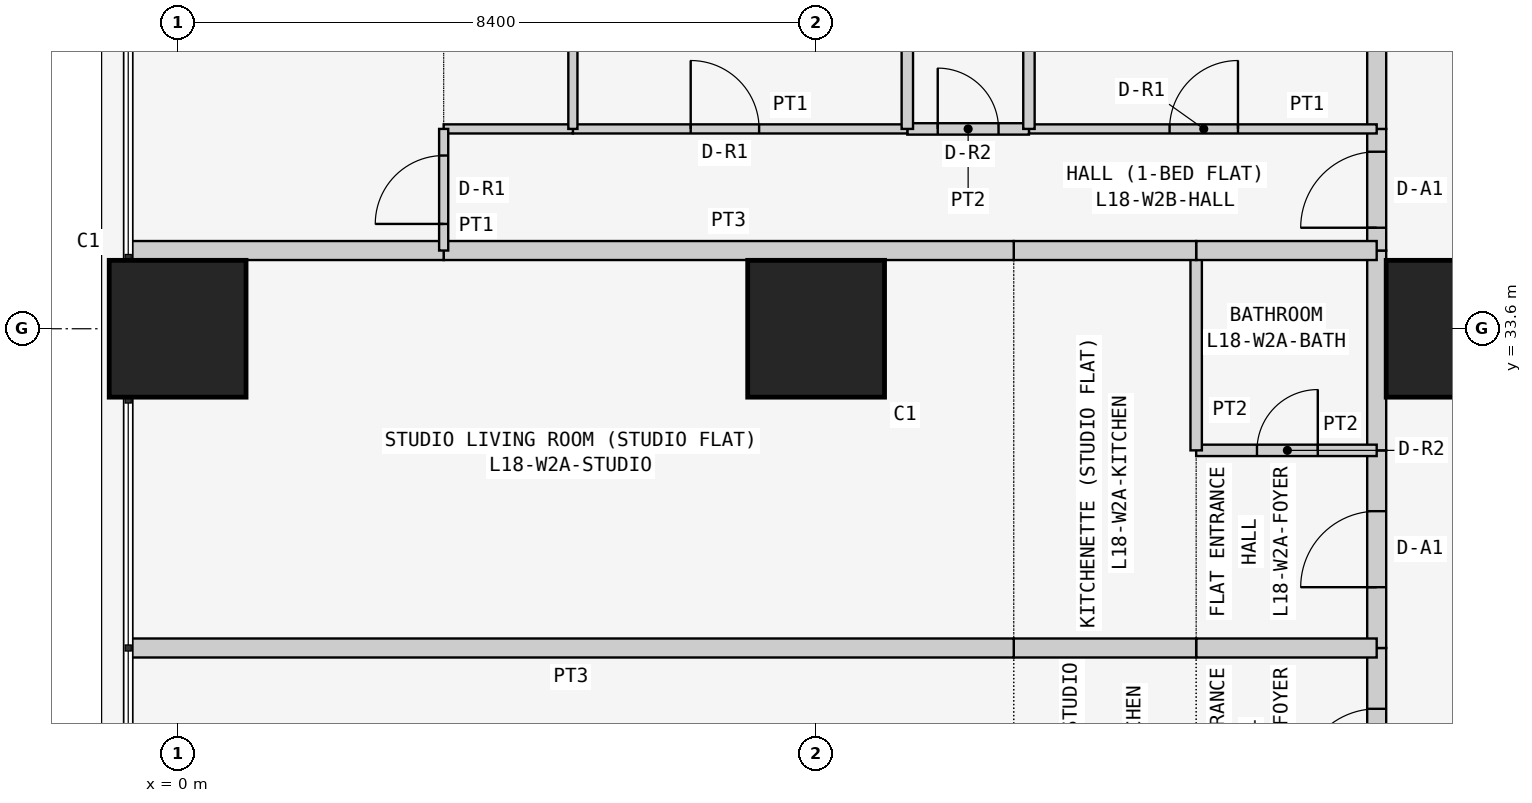
"""IFC4 building model, lengths in metres.
Left out: names, types, materials, properties, quantities, classifications, styles, units other than length and angle.
Written with IfcOpenShell. Run it as: python <this file> out.ifc"""

import sys

from ifc_helpers import new_model, si_unit, direction, frame, frame_2d, origin, origin_2d, place, context, subcontext, project, spatial, rectangle, extrude, element, fill, save


model = new_model("IFC4")
c1 = context("Model", 3, precision=1e-05, world=origin(), true_north=direction((0.0, 1.0)))
c2 = subcontext(c1, "Body", "Model", "MODEL_VIEW")
j1 = project(units=[si_unit("LENGTHUNIT", "METRE"), si_unit("PLANEANGLEUNIT", "RADIAN")], contexts=[c1])
p1 = place(None, origin())
s1 = spatial("IfcSite", under=j1, at=p1, CompositionType="ELEMENT")
p2 = place(p1, origin())
s2 = spatial("IfcBuilding", under=s1, at=p2, CompositionType="ELEMENT")
p3 = place(p2, frame((0.0, 0.0, 74.1)))
s3 = spatial("IfcBuildingStorey", under=s2, at=p3, CompositionType="ELEMENT", Elevation=74.1)
for number, where, z_axis, x_axis in (
    (1, (0.0, 33.6, 0.0), (0.0, 0.0, 1.0), (1.0, 0.0, 0.0)),
    (2, (8.4, 33.6, 0.0), (0.0, 0.0, 1.0), (1.0, 0.0, 0.0)),
    (3, (16.8, 33.6, 0.0), (0.0, 0.0, 1.0), (1.0, 0.0, 0.0)),
):
    element("IfcColumn", number, at=place(p3, frame(where, z_axis=z_axis, x_axis=x_axis)), inside=s3, PredefinedType="COLUMN", context=c2, shape_type="SweptSolid", body=[
        extrude(rectangle(XDim=1.8, YDim=1.8, at=origin_2d()), origin(), (0.0, 0.0, 1.0), 3.6),
    ])
p4 = place(p3, frame((15.775, 26.8, 0.0), z_axis=(0.0, 0.0, 1.0), x_axis=(0.0, 1.0, 0.0)))
e4 = element("IfcWall", 4, at=p4, inside=s3, PredefinedType="PARTITIONING", context=c2, shape_type="SweptSolid", body=[
    extrude(rectangle(XDim=2.6, YDim=0.25, at=frame_2d((1.3, 0.0))), origin(), (0.0, 0.0, 1.0), 3.45),
])
p5 = place(p4, frame((0.8, 0.0, 0.0)))
e5 = element("IfcOpeningElement", 5, at=p5, cuts=e4, PredefinedType="OPENING", context=c2, shape_type="SweptSolid", body=[
    extrude(rectangle(XDim=1.0, YDim=2.1, at=frame_2d((0.5, 1.05))), frame((0.0, 0.135, 0.0), z_axis=(0.0, -1.0, 0.0), x_axis=(1.0, 0.0, 0.0)), (0.0, 0.0, 1.0), 0.27),
])
p6 = place(p3, frame((15.775, 29.4, 0.0), z_axis=(0.0, 0.0, 1.0), x_axis=(0.0, 1.0, 0.0)))
e6 = element("IfcWall", 6, at=p6, inside=s3, PredefinedType="PARTITIONING", context=c2, shape_type="SweptSolid", body=[
    extrude(rectangle(XDim=2.6, YDim=0.25, at=frame_2d((1.3, 0.0))), origin(), (0.0, 0.0, 1.0), 3.45),
])
p7 = place(p6, frame((0.8, 0.0, 0.0)))
e7 = element("IfcOpeningElement", 7, at=p7, cuts=e6, PredefinedType="OPENING", context=c2, shape_type="SweptSolid", body=[
    extrude(rectangle(XDim=1.0, YDim=2.1, at=frame_2d((0.5, 1.05))), frame((0.0, 0.135, 0.0), z_axis=(0.0, -1.0, 0.0), x_axis=(1.0, 0.0, 0.0)), (0.0, 0.0, 1.0), 0.27),
])
p8 = place(p3, frame((15.775, 32.0, 0.0), z_axis=(0.0, 0.0, 1.0), x_axis=(0.0, 1.0, 0.0)))
e8 = element("IfcWall", 8, at=p8, inside=s3, PredefinedType="PARTITIONING", context=c2, shape_type="SweptSolid", body=[
    extrude(rectangle(XDim=2.629, YDim=0.25, at=frame_2d((1.314, 0.0))), origin(), (0.0, 0.0, 1.0), 3.45),
])
p9 = place(p3, frame((15.775, 34.629, 0.0), z_axis=(0.0, 0.0, 1.0), x_axis=(0.0, 1.0, 0.0)))
e9 = element("IfcWall", 9, at=p9, inside=s3, PredefinedType="PARTITIONING", context=c2, shape_type="SweptSolid", body=[
    extrude(rectangle(XDim=1.6, YDim=0.25, at=frame_2d((0.8, 0.0))), origin(), (0.0, 0.0, 1.0), 3.45),
])
p10 = place(p9, frame((0.3, 0.0, 0.0)))
e10 = element("IfcOpeningElement", 10, at=p10, cuts=e9, PredefinedType="OPENING", context=c2, shape_type="SweptSolid", body=[
    extrude(rectangle(XDim=1.0, YDim=2.1, at=frame_2d((0.5, 1.05))), frame((0.0, 0.135, 0.0), z_axis=(0.0, -1.0, 0.0), x_axis=(1.0, 0.0, 0.0)), (0.0, 0.0, 1.0), 0.27),
])
p11 = place(p3, frame((15.775, 36.229, 0.0), z_axis=(0.0, 0.0, 1.0), x_axis=(0.0, 1.0, 0.0)))
e11 = element("IfcWall", 11, at=p11, inside=s3, PredefinedType="PARTITIONING", context=c2, shape_type="SweptSolid", body=[
    extrude(rectangle(XDim=6.471, YDim=0.25, at=frame_2d((3.235, 0.0))), origin(), (0.0, 0.0, 1.0), 3.45),
])
p12 = place(p3, frame((15.775, 29.4, 0.0), z_axis=(0.0, 0.0, 1.0), x_axis=(-1.0, 0.0, 0.0)))
e12 = element("IfcWall", 12, at=p12, inside=s3, PredefinedType="PARTITIONING", context=c2, shape_type="SweptSolid", body=[
    extrude(rectangle(XDim=2.375, YDim=0.25, at=frame_2d((1.188, 0.0))), origin(), (0.0, 0.0, 1.0), 3.45),
])
p13 = place(p3, frame((13.4, 29.4, 0.0), z_axis=(0.0, 0.0, 1.0), x_axis=(-1.0, 0.0, 0.0)))
e13 = element("IfcWall", 13, at=p13, inside=s3, PredefinedType="PARTITIONING", context=c2, shape_type="SweptSolid", body=[
    extrude(rectangle(XDim=2.4, YDim=0.25, at=frame_2d((1.2, 0.0))), origin(), (0.0, 0.0, 1.0), 3.45),
])
p14 = place(p3, frame((11.0, 29.4, 0.0), z_axis=(0.0, 0.0, 1.0), x_axis=(-1.0, 0.0, 0.0)))
e14 = element("IfcWall", 14, at=p14, inside=s3, PredefinedType="PARTITIONING", context=c2, shape_type="SweptSolid", body=[
    extrude(rectangle(XDim=11.65, YDim=0.25, at=frame_2d((5.825, 0.0))), origin(), (0.0, 0.0, 1.0), 3.45),
])
p15 = place(p3, frame((13.4, 32.0, 0.0), z_axis=(0.0, 0.0, 1.0), x_axis=(1.0, 0.0, 0.0)))
e15 = element("IfcWall", 15, at=p15, inside=s3, PredefinedType="PARTITIONING", context=c2, shape_type="SweptSolid", body=[
    extrude(rectangle(XDim=2.375, YDim=0.15, at=frame_2d((1.188, 0.0))), origin(), (0.0, 0.0, 1.0), 3.45),
])
p16 = place(p15, frame((0.8, 0.0, 0.0)))
e16 = element("IfcOpeningElement", 16, at=p16, cuts=e15, PredefinedType="OPENING", context=c2, shape_type="SweptSolid", body=[
    extrude(rectangle(XDim=0.8, YDim=2.1, at=frame_2d((0.4, 1.05))), frame((0.0, 0.085, 0.0), z_axis=(0.0, -1.0, 0.0), x_axis=(1.0, 0.0, 0.0)), (0.0, 0.0, 1.0), 0.17),
])
p17 = place(p3, frame((13.4, 32.0, 0.0), z_axis=(0.0, 0.0, 1.0), x_axis=(0.0, 1.0, 0.0)))
e17 = element("IfcWall", 17, at=p17, inside=s3, PredefinedType="PARTITIONING", context=c2, shape_type="SweptSolid", body=[
    extrude(rectangle(XDim=2.629, YDim=0.15, at=frame_2d((1.314, 0.0))), origin(), (0.0, 0.0, 1.0), 3.45),
])
p18 = place(p3, frame((13.4, 34.629, 0.0), z_axis=(0.0, 0.0, 1.0), x_axis=(1.0, 0.0, 0.0)))
e18 = element("IfcWall", 18, at=p18, inside=s3, PredefinedType="PARTITIONING", context=c2, shape_type="SweptSolid", body=[
    extrude(rectangle(XDim=2.375, YDim=0.25, at=frame_2d((1.188, 0.0))), origin(), (0.0, 0.0, 1.0), 3.45),
])
p19 = place(p3, frame((11.0, 34.629, 0.0), z_axis=(0.0, 0.0, 1.0), x_axis=(1.0, 0.0, 0.0)))
e19 = element("IfcWall", 19, at=p19, inside=s3, PredefinedType="PARTITIONING", context=c2, shape_type="SweptSolid", body=[
    extrude(rectangle(XDim=2.4, YDim=0.25, at=frame_2d((1.2, 0.0))), origin(), (0.0, 0.0, 1.0), 3.45),
])
p20 = place(p3, frame((3.5, 34.629, 0.0), z_axis=(0.0, 0.0, 1.0), x_axis=(1.0, 0.0, 0.0)))
e20 = element("IfcWall", 20, at=p20, inside=s3, PredefinedType="PARTITIONING", context=c2, shape_type="SweptSolid", body=[
    extrude(rectangle(XDim=7.5, YDim=0.25, at=frame_2d((3.75, 0.0))), origin(), (0.0, 0.0, 1.0), 3.45),
])
p21 = place(p3, frame((-0.65, 34.629, 0.0), z_axis=(0.0, 0.0, 1.0), x_axis=(1.0, 0.0, 0.0)))
e21 = element("IfcWall", 21, at=p21, inside=s3, PredefinedType="PARTITIONING", context=c2, shape_type="SweptSolid", body=[
    extrude(rectangle(XDim=4.15, YDim=0.25, at=frame_2d((2.075, 0.0))), origin(), (0.0, 0.0, 1.0), 3.45),
])
p22 = place(p3, frame((11.2, 36.229, 0.0), z_axis=(0.0, 0.0, 1.0), x_axis=(1.0, 0.0, 0.0)))
e22 = element("IfcWall", 22, at=p22, inside=s3, PredefinedType="PARTITIONING", context=c2, shape_type="SweptSolid", body=[
    extrude(rectangle(XDim=4.575, YDim=0.12, at=frame_2d((2.288, 0.0))), origin(), (0.0, 0.0, 1.0), 3.45),
])
p23 = place(p22, frame((1.85, 0.0, 0.0)))
e23 = element("IfcOpeningElement", 23, at=p23, cuts=e22, PredefinedType="OPENING", context=c2, shape_type="SweptSolid", body=[
    extrude(rectangle(XDim=0.9, YDim=2.1, at=frame_2d((0.45, 1.05))), frame((0.0, 0.07, 0.0), z_axis=(0.0, -1.0, 0.0), x_axis=(1.0, 0.0, 0.0)), (0.0, 0.0, 1.0), 0.14),
])
p24 = place(p3, frame((9.6, 36.229, 0.0), z_axis=(0.0, 0.0, 1.0), x_axis=(1.0, 0.0, 0.0)))
e24 = element("IfcWall", 24, at=p24, inside=s3, PredefinedType="PARTITIONING", context=c2, shape_type="SweptSolid", body=[
    extrude(rectangle(XDim=1.6, YDim=0.15, at=frame_2d((0.8, 0.0))), origin(), (0.0, 0.0, 1.0), 3.45),
])
p25 = place(p24, frame((0.4, 0.0, 0.0)))
e25 = element("IfcOpeningElement", 25, at=p25, cuts=e24, PredefinedType="OPENING", context=c2, shape_type="SweptSolid", body=[
    extrude(rectangle(XDim=0.8, YDim=2.1, at=frame_2d((0.4, 1.05))), frame((0.0, 0.085, 0.0), z_axis=(0.0, -1.0, 0.0), x_axis=(1.0, 0.0, 0.0)), (0.0, 0.0, 1.0), 0.17),
])
p26 = place(p3, frame((5.2, 36.229, 0.0), z_axis=(0.0, 0.0, 1.0), x_axis=(1.0, 0.0, 0.0)))
e26 = element("IfcWall", 26, at=p26, inside=s3, PredefinedType="PARTITIONING", context=c2, shape_type="SweptSolid", body=[
    extrude(rectangle(XDim=4.4, YDim=0.12, at=frame_2d((2.2, 0.0))), origin(), (0.0, 0.0, 1.0), 3.45),
])
p27 = place(p26, frame((1.55, 0.0, 0.0)))
e27 = element("IfcOpeningElement", 27, at=p27, cuts=e26, PredefinedType="OPENING", context=c2, shape_type="SweptSolid", body=[
    extrude(rectangle(XDim=0.9, YDim=2.1, at=frame_2d((0.45, 1.05))), frame((0.0, 0.07, 0.0), z_axis=(0.0, -1.0, 0.0), x_axis=(1.0, 0.0, 0.0)), (0.0, 0.0, 1.0), 0.14),
])
p28 = place(p3, frame((3.5, 36.229, 0.0), z_axis=(0.0, 0.0, 1.0), x_axis=(1.0, 0.0, 0.0)))
e28 = element("IfcWall", 28, at=p28, inside=s3, PredefinedType="PARTITIONING", context=c2, shape_type="SweptSolid", body=[
    extrude(rectangle(XDim=1.7, YDim=0.12, at=frame_2d((0.85, 0.0))), origin(), (0.0, 0.0, 1.0), 3.45),
])
p29 = place(p3, frame((3.5, 34.629, 0.0), z_axis=(0.0, 0.0, 1.0), x_axis=(0.0, 1.0, 0.0)))
e29 = element("IfcWall", 29, at=p29, inside=s3, PredefinedType="PARTITIONING", context=c2, shape_type="SweptSolid", body=[
    extrude(rectangle(XDim=1.6, YDim=0.12, at=frame_2d((0.8, 0.0))), origin(), (0.0, 0.0, 1.0), 3.45),
])
p30 = place(p29, frame((0.35, 0.0, 0.0)))
e30 = element("IfcOpeningElement", 30, at=p30, cuts=e29, PredefinedType="OPENING", context=c2, shape_type="SweptSolid", body=[
    extrude(rectangle(XDim=0.9, YDim=2.1, at=frame_2d((0.45, 1.05))), frame((0.0, 0.07, 0.0), z_axis=(0.0, -1.0, 0.0), x_axis=(1.0, 0.0, 0.0)), (0.0, 0.0, 1.0), 0.14),
])
for number, where, z_axis, x_axis in (
    (31, (11.2, 36.229, 0.0), (0.0, 0.0, 1.0), (0.0, 1.0, 0.0)),
    (32, (9.6, 36.229, 0.0), (0.0, 0.0, 1.0), (0.0, 1.0, 0.0)),
):
    element("IfcWall", number, at=place(p3, frame(where, z_axis=z_axis, x_axis=x_axis)), inside=s3, PredefinedType="PARTITIONING", context=c2, shape_type="SweptSolid", body=[
        extrude(rectangle(XDim=6.471, YDim=0.15, at=frame_2d((3.235, 0.0))), origin(), (0.0, 0.0, 1.0), 3.45),
    ])
p31 = place(p3, frame((5.2, 36.229, 0.0), z_axis=(0.0, 0.0, 1.0), x_axis=(0.0, 1.0, 0.0)))
e33 = element("IfcWall", 33, at=p31, inside=s3, PredefinedType="PARTITIONING", context=c2, shape_type="SweptSolid", body=[
    extrude(rectangle(XDim=6.471, YDim=0.12, at=frame_2d((3.235, 0.0))), origin(), (0.0, 0.0, 1.0), 3.45),
])
p32 = place(p5, origin())
e34 = element("IfcDoor", 34, at=p32, inside=s3, OperationType="SINGLE_SWING_LEFT", PredefinedType="DOOR", context=c2, shape_type="SweptSolid", body=[
    extrude(rectangle(XDim=1.0, YDim=2.1, at=frame_2d((0.5, 1.05))), frame((0.0, 0.025, 0.0), z_axis=(0.0, -1.0, 0.0), x_axis=(1.0, 0.0, 0.0)), (0.0, 0.0, 1.0), 0.05),
])
fill(e5, e34)
p33 = place(p7, origin())
e35 = element("IfcDoor", 35, at=p33, inside=s3, OperationType="SINGLE_SWING_LEFT", PredefinedType="DOOR", context=c2, shape_type="SweptSolid", body=[
    extrude(rectangle(XDim=1.0, YDim=2.1, at=frame_2d((0.5, 1.05))), frame((0.0, 0.025, 0.0), z_axis=(0.0, -1.0, 0.0), x_axis=(1.0, 0.0, 0.0)), (0.0, 0.0, 1.0), 0.05),
])
fill(e7, e35)
p34 = place(p16, origin())
e36 = element("IfcDoor", 36, at=p34, inside=s3, OperationType="SINGLE_SWING_RIGHT", PredefinedType="DOOR", context=c2, shape_type="SweptSolid", body=[
    extrude(rectangle(XDim=0.8, YDim=2.1, at=frame_2d((0.4, 1.05))), frame((0.0, 0.025, 0.0), z_axis=(0.0, -1.0, 0.0), x_axis=(1.0, 0.0, 0.0)), (0.0, 0.0, 1.0), 0.05),
])
fill(e16, e36)
p35 = place(p10, origin())
e37 = element("IfcDoor", 37, at=p35, inside=s3, OperationType="SINGLE_SWING_LEFT", PredefinedType="DOOR", context=c2, shape_type="SweptSolid", body=[
    extrude(rectangle(XDim=1.0, YDim=2.1, at=frame_2d((0.5, 1.05))), frame((0.0, 0.025, 0.0), z_axis=(0.0, -1.0, 0.0), x_axis=(1.0, 0.0, 0.0)), (0.0, 0.0, 1.0), 0.05),
])
fill(e10, e37)
p36 = place(p23, origin())
e38 = element("IfcDoor", 38, at=p36, inside=s3, OperationType="SINGLE_SWING_RIGHT", PredefinedType="DOOR", context=c2, shape_type="SweptSolid", body=[
    extrude(rectangle(XDim=0.9, YDim=2.1, at=frame_2d((0.45, 1.05))), frame((0.0, 0.025, 0.0), z_axis=(0.0, -1.0, 0.0), x_axis=(1.0, 0.0, 0.0)), (0.0, 0.0, 1.0), 0.05),
])
fill(e23, e38)
p37 = place(p25, origin())
e39 = element("IfcDoor", 39, at=p37, inside=s3, OperationType="SINGLE_SWING_LEFT", PredefinedType="DOOR", context=c2, shape_type="SweptSolid", body=[
    extrude(rectangle(XDim=0.8, YDim=2.1, at=frame_2d((0.4, 1.05))), frame((0.0, 0.025, 0.0), z_axis=(0.0, -1.0, 0.0), x_axis=(1.0, 0.0, 0.0)), (0.0, 0.0, 1.0), 0.05),
])
fill(e25, e39)
p38 = place(p27, origin())
e40 = element("IfcDoor", 40, at=p38, inside=s3, OperationType="SINGLE_SWING_LEFT", PredefinedType="DOOR", context=c2, shape_type="SweptSolid", body=[
    extrude(rectangle(XDim=0.9, YDim=2.1, at=frame_2d((0.45, 1.05))), frame((0.0, 0.025, 0.0), z_axis=(0.0, -1.0, 0.0), x_axis=(1.0, 0.0, 0.0)), (0.0, 0.0, 1.0), 0.05),
])
fill(e27, e40)
p39 = place(p30, origin())
e41 = element("IfcDoor", 41, at=p39, inside=s3, OperationType="SINGLE_SWING_LEFT", PredefinedType="DOOR", context=c2, shape_type="SweptSolid", body=[
    extrude(rectangle(XDim=0.9, YDim=2.1, at=frame_2d((0.45, 1.05))), frame((0.0, 0.025, 0.0), z_axis=(0.0, -1.0, 0.0), x_axis=(1.0, 0.0, 0.0)), (0.0, 0.0, 1.0), 0.05),
])
fill(e30, e41)
save(model, sys.argv[1])
